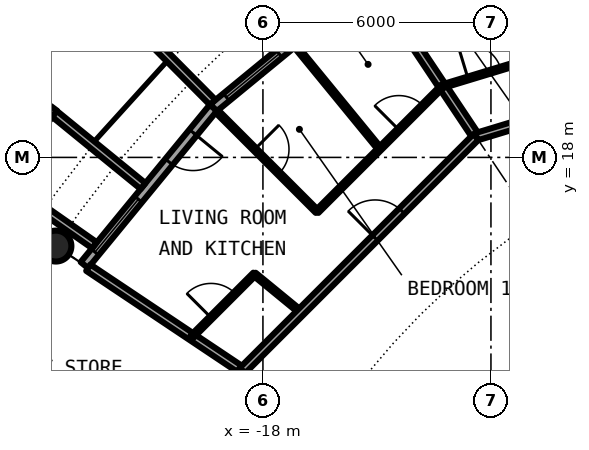
"""IFC4 building model, lengths in metres.
Left out: names, types, materials, properties, quantities, classifications, styles, units other than length and angle.
Written with IfcOpenShell. Run it as: python <this file> out.ifc"""

import sys

from ifc_helpers import new_model, si_unit, direction, frame, frame_2d, origin, origin_2d, place, context, subcontext, project, spatial, rectangle, circle, hollow_circle, extrude, element, fill, save


model = new_model("IFC4")
c1 = context("Model", 3, precision=1e-05, world=origin(), true_north=direction((0.0, 1.0)))
c2 = subcontext(c1, "Body", "Model", "MODEL_VIEW")
j1 = project(units=[si_unit("LENGTHUNIT", "METRE"), si_unit("PLANEANGLEUNIT", "RADIAN")], contexts=[c1])
p1 = place(None, origin())
s1 = spatial("IfcSite", under=j1, at=p1, CompositionType="ELEMENT")
p2 = place(p1, origin())
s2 = spatial("IfcBuilding", under=s1, at=p2, CompositionType="ELEMENT")
p3 = place(p2, frame((0.0, 0.0, 196.3)))
s3 = spatial("IfcBuildingStorey", under=s2, at=p3, CompositionType="ELEMENT", Elevation=196.3)
p4 = place(p3, frame((-23.448, 15.667, 0.0), z_axis=(0.0, 0.0, 1.0), x_axis=(1.0, 0.0, 0.0)))
e1 = element("IfcColumn", 1, at=p4, inside=s3, PredefinedType="COLUMN", context=c2, shape_type="SweptSolid", body=[
    extrude(hollow_circle(Radius=0.406, WallThickness=0.03, at=origin_2d()), origin(), (0.0, 0.0, 1.0), 3.05),
])
p5 = place(p3, frame((-15.167, 22.699, 0.0), z_axis=(0.0, 0.0, 1.0), x_axis=(-0.773019449054, -0.634382322723, 0.0)))
e2 = element("IfcWall", 2, at=p5, inside=s3, PredefinedType="SOLIDWALL", context=c2, shape_type="SweptSolid", body=[
    extrude(rectangle(XDim=5.352, YDim=0.25, at=frame_2d((2.676, 0.0))), origin(), (0.0, 0.0, 1.0), 2.7),
])
p6 = place(p5, frame((0.841, 0.0, 0.0)))
e3 = element("IfcOpeningElement", 3, at=p6, cuts=e2, PredefinedType="OPENING", context=c2, shape_type="SweptSolid", body=[
    extrude(rectangle(XDim=1.0, YDim=2.2, at=frame_2d((0.5, 1.1))), frame((0.0, 0.135, 0.0), z_axis=(0.0, -1.0, 0.0), x_axis=(1.0, 0.0, 0.0)), (0.0, 0.0, 1.0), 0.27),
])
p7 = place(p5, frame((3.111, 0.0, 0.3)))
e4 = element("IfcOpeningElement", 4, at=p7, cuts=e2, PredefinedType="OPENING", context=c2, shape_type="SweptSolid", body=[
    extrude(rectangle(XDim=1.8, YDim=2.1, at=frame_2d((0.9, 1.05))), frame((0.0, 0.135, 0.0), z_axis=(0.0, -1.0, 0.0), x_axis=(1.0, 0.0, 0.0)), (0.0, 0.0, 1.0), 0.27),
])
p8 = place(p3, frame((-19.323, 19.45, -0.03), z_axis=(0.0, 0.0, 1.0), x_axis=(-0.704476739375, 0.709727076896, 0.0)))
e5 = element("IfcWall", 5, at=p8, inside=s3, PredefinedType="SOLIDWALL", context=c2, shape_type="SweptSolid", body=[
    extrude(rectangle(XDim=2.883, YDim=0.2, at=frame_2d((1.441, 0.0))), origin(), (0.0, 0.0, 1.0), 2.73),
])
p9 = place(p3, frame((-19.304, 19.304, 0.0), z_axis=(0.0, 0.0, 1.0), x_axis=(-0.634382322723, -0.773019449054, 0.0)))
e6 = element("IfcWall", 6, at=p9, inside=s3, PredefinedType="SOLIDWALL", context=c2, shape_type="SweptSolid", body=[
    extrude(rectangle(XDim=5.352, YDim=0.25, at=frame_2d((2.676, 0.0))), origin(), (0.0, 0.0, 1.0), 2.7),
])
p10 = place(p9, frame((0.841, 0.0, 0.0)))
e7 = element("IfcOpeningElement", 7, at=p10, cuts=e6, PredefinedType="OPENING", context=c2, shape_type="SweptSolid", body=[
    extrude(rectangle(XDim=1.0, YDim=2.2, at=frame_2d((0.5, 1.1))), frame((0.0, 0.135, 0.0), z_axis=(0.0, -1.0, 0.0), x_axis=(1.0, 0.0, 0.0)), (0.0, 0.0, 1.0), 0.27),
])
p11 = place(p9, frame((3.111, 0.0, 0.3)))
e8 = element("IfcOpeningElement", 8, at=p11, cuts=e6, PredefinedType="OPENING", context=c2, shape_type="SweptSolid", body=[
    extrude(rectangle(XDim=1.8, YDim=2.1, at=frame_2d((0.9, 1.05))), frame((0.0, 0.135, 0.0), z_axis=(0.0, -1.0, 0.0), x_axis=(1.0, 0.0, 0.0)), (0.0, 0.0, 1.0), 0.27),
])
p12 = place(p3, frame((-23.497, 19.289, -0.03), z_axis=(0.0, 0.0, 1.0), x_axis=(-0.602806268067, -0.797887588059, 0.0)))
e9 = element("IfcWall", 9, at=p12, inside=s3, PredefinedType="SOLIDWALL", context=c2, shape_type="SweptSolid", body=[
    extrude(rectangle(XDim=2.447, YDim=0.2, at=frame_2d((1.223, 0.0))), origin(), (0.0, 0.0, 1.0), 2.73),
])
p13 = place(p12, frame((0.183, 0.0, 0.33)))
e10 = element("IfcOpeningElement", 10, at=p13, cuts=e9, PredefinedType="OPENING", context=c2, shape_type="SweptSolid", body=[
    extrude(circle(Radius=1.04, at=frame_2d((1.04, 1.04))), frame((0.0, 0.11, 0.0), z_axis=(0.0, -1.0, 0.0), x_axis=(1.0, 0.0, 0.0)), (0.0, 0.0, 1.0), 0.22),
])
p14 = place(p3, frame((-21.155, 17.246, -0.03), z_axis=(0.0, 0.0, 1.0), x_axis=(-0.775179004516, 0.631741648902, 0.0)))
e11 = element("IfcWall", 11, at=p14, inside=s3, PredefinedType="SOLIDWALL", context=c2, shape_type="SweptSolid", body=[
    extrude(rectangle(XDim=3.006, YDim=0.2, at=frame_2d((1.503, 0.0))), origin(), (0.0, 0.0, 1.0), 2.73),
])
p15 = place(p3, frame((-22.433, 15.688, -0.03), z_axis=(0.0, 0.0, 1.0), x_axis=(-0.819373043115, 0.573260687834, 0.0)))
e12 = element("IfcWall", 12, at=p15, inside=s3, PredefinedType="SOLIDWALL", context=c2, shape_type="SweptSolid", body=[
    extrude(rectangle(XDim=2.925, YDim=0.2, at=frame_2d((1.463, 0.0))), origin(), (0.0, 0.0, 1.0), 2.73),
])
p16 = place(p3, frame((-18.224, 14.927, 0.0), z_axis=(0.0, 0.0, 1.0), x_axis=(0.773446828454, -0.633861186344, 0.0)))
e13 = element("IfcWall", 13, at=p16, inside=s3, PredefinedType="PARTITIONING", context=c2, shape_type="SweptSolid", body=[
    extrude(rectangle(XDim=1.578, YDim=0.1, at=frame_2d((0.789, 0.0))), origin(), (0.0, 0.0, 1.0), 2.7),
])
p17 = place(p3, frame((-22.595, 15.098, 0.0), z_axis=(0.0, 0.0, 1.0), x_axis=(0.831387096605, -0.55569370664, 0.0)))
e14 = element("IfcWall", 14, at=p17, inside=s3, PredefinedType="PARTITIONING", context=c2, shape_type="SweptSolid", body=[
    extrude(rectangle(XDim=4.875, YDim=0.2, at=frame_2d((2.438, 0.0))), origin(), (0.0, 0.0, 1.0), 2.7),
])
p18 = place(p3, frame((-19.216, 19.216, 0.0), z_axis=(0.0, 0.0, 1.0), x_axis=(0.707106781187, -0.707106781187, 0.0)))
e15 = element("IfcWall", 15, at=p18, inside=s3, PredefinedType="PARTITIONING", context=c2, shape_type="SweptSolid", body=[
    extrude(rectangle(XDim=3.735, YDim=0.1, at=frame_2d((1.868, 0.0))), origin(), (0.0, 0.0, 1.0), 2.7),
])
p19 = place(p18, frame((1.417, 0.0, 0.0)))
e16 = element("IfcOpeningElement", 16, at=p19, cuts=e15, PredefinedType="OPENING", context=c2, shape_type="SweptSolid", body=[
    extrude(rectangle(XDim=0.9, YDim=2.3, at=frame_2d((0.45, 1.15))), frame((0.0, 0.06, 0.0), z_axis=(0.0, -1.0, 0.0), x_axis=(1.0, 0.0, 0.0)), (0.0, 0.0, 1.0), 0.12),
])
p20 = place(p3, frame((-17.22, 21.023, 0.0), z_axis=(0.0, 0.0, 1.0), x_axis=(0.633737383709, -0.773548271597, 0.0)))
e17 = element("IfcWall", 17, at=p20, inside=s3, PredefinedType="PARTITIONING", context=c2, shape_type="SweptSolid", body=[
    extrude(rectangle(XDim=3.618, YDim=0.1, at=frame_2d((1.809, 0.0))), origin(), (0.0, 0.0, 1.0), 2.7),
])
p21 = place(p3, frame((-15.097, 22.596, 0.0), z_axis=(0.0, 0.0, 1.0), x_axis=(0.555462686211, -0.831541462723, 0.0)))
e18 = element("IfcWall", 18, at=p21, inside=s3, PredefinedType="PARTITIONING", context=c2, shape_type="SweptSolid", body=[
    extrude(rectangle(XDim=4.875, YDim=0.2, at=frame_2d((2.438, 0.0))), origin(), (0.0, 0.0, 1.0), 2.7),
])
p22 = place(p3, frame((-12.887, 23.925, 0.0), z_axis=(0.0, 0.0, 1.0), x_axis=(0.474281720599, -0.88037313084, 0.0)))
e19 = element("IfcWall", 19, at=p22, inside=s3, PredefinedType="PARTITIONING", context=c2, shape_type="SweptSolid", body=[
    extrude(rectangle(XDim=3.842, YDim=0.1, at=frame_2d((1.921, 0.0))), origin(), (0.0, 0.0, 1.0), 2.7),
])
p23 = place(p3, frame((-14.718, 9.832, 0.0), z_axis=(0.0, 0.0, 1.0), x_axis=(0.831437137577, 0.555618831806, 0.0)))
e20 = element("IfcWall", 20, at=p23, inside=s3, PredefinedType="PARTITIONING", context=c2, shape_type="SweptSolid", body=[
    extrude(rectangle(XDim=13.549, YDim=0.2, at=frame_2d((6.774, 0.0))), origin(), (0.0, 0.0, 1.0), 2.7),
])
p24 = place(p23, frame((7.968, 0.0, 0.0)))
e21 = element("IfcOpeningElement", 21, at=p24, cuts=e20, PredefinedType="OPENING", context=c2, shape_type="SweptSolid", body=[
    extrude(rectangle(XDim=1.0, YDim=2.3, at=frame_2d((0.5, 1.15))), frame((0.0, 0.11, 0.0), z_axis=(0.0, -1.0, 0.0), x_axis=(1.0, 0.0, 0.0)), (0.0, 0.0, 1.0), 0.22),
])
p25 = place(p3, frame((-12.389, 18.542, 0.0), z_axis=(0.0, 0.0, 1.0), x_axis=(0.956942051091, 0.290279022415, 0.0)))
e22 = element("IfcWall", 22, at=p25, inside=s3, PredefinedType="PARTITIONING", context=c2, shape_type="SweptSolid", body=[
    extrude(rectangle(XDim=12.946, YDim=0.2, at=frame_2d((6.473, 0.0))), origin(), (0.0, 0.0, 1.0), 2.7),
])
p26 = place(p25, frame((4.895, 0.0, 0.0)))
e23 = element("IfcOpeningElement", 23, at=p26, cuts=e22, PredefinedType="OPENING", context=c2, shape_type="SweptSolid", body=[
    extrude(rectangle(XDim=1.0, YDim=2.3, at=frame_2d((0.5, 1.15))), frame((0.0, 0.11, 0.0), z_axis=(0.0, -1.0, 0.0), x_axis=(1.0, 0.0, 0.0)), (0.0, 0.0, 1.0), 0.22),
])
p27 = place(p3, frame((-18.542, 12.389, 0.0), z_axis=(0.0, 0.0, 1.0), x_axis=(0.707106781187, 0.707106781187, 0.0)))
e24 = element("IfcWall", 24, at=p27, inside=s3, PredefinedType="PARTITIONING", context=c2, shape_type="SweptSolid", body=[
    extrude(rectangle(XDim=8.702, YDim=0.2, at=frame_2d((4.351, 0.0))), origin(), (0.0, 0.0, 1.0), 2.7),
])
p28 = place(p27, frame((4.938, 0.0, 0.0)))
e25 = element("IfcOpeningElement", 25, at=p28, cuts=e24, PredefinedType="OPENING", context=c2, shape_type="SweptSolid", body=[
    extrude(rectangle(XDim=1.0, YDim=2.3, at=frame_2d((0.5, 1.15))), frame((0.0, 0.11, 0.0), z_axis=(0.0, -1.0, 0.0), x_axis=(1.0, 0.0, 0.0)), (0.0, 0.0, 1.0), 0.22),
])
p29 = place(p3, frame((-19.317, 10.915, 0.0), z_axis=(0.0, 0.0, 1.0), x_axis=(0.465359652486, 0.885121683068, 0.0)))
e26 = element("IfcWall", 26, at=p29, inside=s3, PredefinedType="PARTITIONING", context=c2, shape_type="SweptSolid", body=[
    extrude(rectangle(XDim=1.665, YDim=0.2, at=frame_2d((0.833, 0.0))), origin(), (0.0, 0.0, 1.0), 2.7),
])
p30 = place(p3, frame((-13.281, 19.871, 0.0), z_axis=(0.0, 0.0, 1.0), x_axis=(0.956938868877, 0.290289512785, 0.0)))
e27 = element("IfcWall", 27, at=p30, inside=s3, PredefinedType="PARTITIONING", context=c2, shape_type="SweptSolid", body=[
    extrude(rectangle(XDim=6.941, YDim=0.1, at=frame_2d((3.47, 0.0))), origin(), (0.0, 0.0, 1.0), 2.7),
])
p31 = place(p30, frame((3.025, 0.0, 0.0)))
e28 = element("IfcOpeningElement", 28, at=p31, cuts=e27, PredefinedType="OPENING", context=c2, shape_type="SweptSolid", body=[
    extrude(rectangle(XDim=0.9, YDim=2.3, at=frame_2d((0.45, 1.15))), frame((0.0, 0.06, 0.0), z_axis=(0.0, -1.0, 0.0), x_axis=(1.0, 0.0, 0.0)), (0.0, 0.0, 1.0), 0.12),
])
p32 = place(p30, frame((0.708, 0.0, 0.0)))
e29 = element("IfcOpeningElement", 29, at=p32, cuts=e27, PredefinedType="OPENING", context=c2, shape_type="SweptSolid", body=[
    extrude(rectangle(XDim=0.9, YDim=2.3, at=frame_2d((0.45, 1.15))), frame((0.0, 0.06, 0.0), z_axis=(0.0, -1.0, 0.0), x_axis=(1.0, 0.0, 0.0)), (0.0, 0.0, 1.0), 0.12),
])
p33 = place(p3, frame((-19.867, 13.283, 0.0), z_axis=(0.0, 0.0, 1.0), x_axis=(0.707106781187, 0.707106781187, 0.0)))
e30 = element("IfcWall", 30, at=p33, inside=s3, PredefinedType="PARTITIONING", context=c2, shape_type="SweptSolid", body=[
    extrude(rectangle(XDim=2.332, YDim=0.1, at=frame_2d((1.166, 0.0))), origin(), (0.0, 0.0, 1.0), 2.7),
])
p34 = place(p33, frame((0.709, 0.0, 0.0)))
e31 = element("IfcOpeningElement", 31, at=p34, cuts=e30, PredefinedType="OPENING", context=c2, shape_type="SweptSolid", body=[
    extrude(rectangle(XDim=0.9, YDim=2.3, at=frame_2d((0.45, 1.15))), frame((0.0, 0.06, 0.0), z_axis=(0.0, -1.0, 0.0), x_axis=(1.0, 0.0, 0.0)), (0.0, 0.0, 1.0), 0.12),
])
p35 = place(p3, frame((-16.575, 16.575, 0.0), z_axis=(0.0, 0.0, 1.0), x_axis=(0.707080600289, 0.707132961115, 0.0)))
e32 = element("IfcWall", 32, at=p35, inside=s3, PredefinedType="PARTITIONING", context=c2, shape_type="SweptSolid", body=[
    extrude(rectangle(XDim=4.663, YDim=0.1, at=frame_2d((2.331, 0.0))), origin(), (0.0, 0.0, 1.0), 2.7),
])
p36 = place(p35, frame((3.043, 0.0, 0.0)))
e33 = element("IfcOpeningElement", 33, at=p36, cuts=e32, PredefinedType="OPENING", context=c2, shape_type="SweptSolid", body=[
    extrude(rectangle(XDim=0.9, YDim=2.3, at=frame_2d((0.45, 1.15))), frame((0.0, 0.06, 0.0), z_axis=(0.0, -1.0, 0.0), x_axis=(1.0, 0.0, 0.0)), (0.0, 0.0, 1.0), 0.12),
])
p37 = place(p7, origin())
e34 = element("IfcWindow", 34, at=p37, inside=s3, PartitioningType="SINGLE_PANEL", PredefinedType="WINDOW", context=c2, shape_type="SweptSolid", body=[
    extrude(rectangle(XDim=1.8, YDim=2.1, at=frame_2d((0.9, 1.05))), frame((0.0, 0.03, 0.0), z_axis=(0.0, -1.0, 0.0), x_axis=(1.0, 0.0, 0.0)), (0.0, 0.0, 1.0), 0.06),
])
fill(e4, e34)
p38 = place(p10, origin())
e35 = element("IfcDoor", 35, at=p38, inside=s3, OperationType="SINGLE_SWING_LEFT", PredefinedType="DOOR", context=c2, shape_type="SweptSolid", body=[
    extrude(rectangle(XDim=1.0, YDim=2.2, at=frame_2d((0.5, 1.1))), frame((0.0, 0.025, 0.0), z_axis=(0.0, -1.0, 0.0), x_axis=(1.0, 0.0, 0.0)), (0.0, 0.0, 1.0), 0.05),
])
fill(e7, e35)
p39 = place(p11, origin())
e36 = element("IfcWindow", 36, at=p39, inside=s3, PartitioningType="SINGLE_PANEL", PredefinedType="WINDOW", context=c2, shape_type="SweptSolid", body=[
    extrude(rectangle(XDim=1.8, YDim=2.1, at=frame_2d((0.9, 1.05))), frame((0.0, 0.03, 0.0), z_axis=(0.0, -1.0, 0.0), x_axis=(1.0, 0.0, 0.0)), (0.0, 0.0, 1.0), 0.06),
])
fill(e8, e36)
p40 = place(p32, origin())
e37 = element("IfcDoor", 37, at=p40, inside=s3, OperationType="SINGLE_SWING_LEFT", PredefinedType="DOOR", context=c2, shape_type="SweptSolid", body=[
    extrude(rectangle(XDim=0.9, YDim=2.3, at=frame_2d((0.45, 1.15))), frame((0.0, 0.025, 0.0), z_axis=(0.0, -1.0, 0.0), x_axis=(1.0, 0.0, 0.0)), (0.0, 0.0, 1.0), 0.05),
])
fill(e29, e37)
p41 = place(p28, origin())
e38 = element("IfcDoor", 38, at=p41, inside=s3, OperationType="SINGLE_SWING_RIGHT", PredefinedType="DOOR", context=c2, shape_type="SweptSolid", body=[
    extrude(rectangle(XDim=1.0, YDim=2.3, at=frame_2d((0.5, 1.15))), frame((0.0, 0.025, 0.0), z_axis=(0.0, -1.0, 0.0), x_axis=(1.0, 0.0, 0.0)), (0.0, 0.0, 1.0), 0.05),
])
fill(e25, e38)
p42 = place(p34, origin())
e39 = element("IfcDoor", 39, at=p42, inside=s3, OperationType="SINGLE_SWING_LEFT", PredefinedType="DOOR", context=c2, shape_type="SweptSolid", body=[
    extrude(rectangle(XDim=0.9, YDim=2.3, at=frame_2d((0.45, 1.15))), frame((0.0, 0.025, 0.0), z_axis=(0.0, -1.0, 0.0), x_axis=(1.0, 0.0, 0.0)), (0.0, 0.0, 1.0), 0.05),
])
fill(e31, e39)
p43 = place(p19, origin())
e40 = element("IfcDoor", 40, at=p43, inside=s3, OperationType="SINGLE_SWING_LEFT", PredefinedType="DOOR", context=c2, shape_type="SweptSolid", body=[
    extrude(rectangle(XDim=0.9, YDim=2.3, at=frame_2d((0.45, 1.15))), frame((0.0, 0.025, 0.0), z_axis=(0.0, -1.0, 0.0), x_axis=(1.0, 0.0, 0.0)), (0.0, 0.0, 1.0), 0.05),
])
fill(e16, e40)
p44 = place(p36, origin())
e41 = element("IfcDoor", 41, at=p44, inside=s3, OperationType="SINGLE_SWING_RIGHT", PredefinedType="DOOR", context=c2, shape_type="SweptSolid", body=[
    extrude(rectangle(XDim=0.9, YDim=2.3, at=frame_2d((0.45, 1.15))), frame((0.0, 0.025, 0.0), z_axis=(0.0, -1.0, 0.0), x_axis=(1.0, 0.0, 0.0)), (0.0, 0.0, 1.0), 0.05),
])
fill(e33, e41)
save(model, sys.argv[1])
